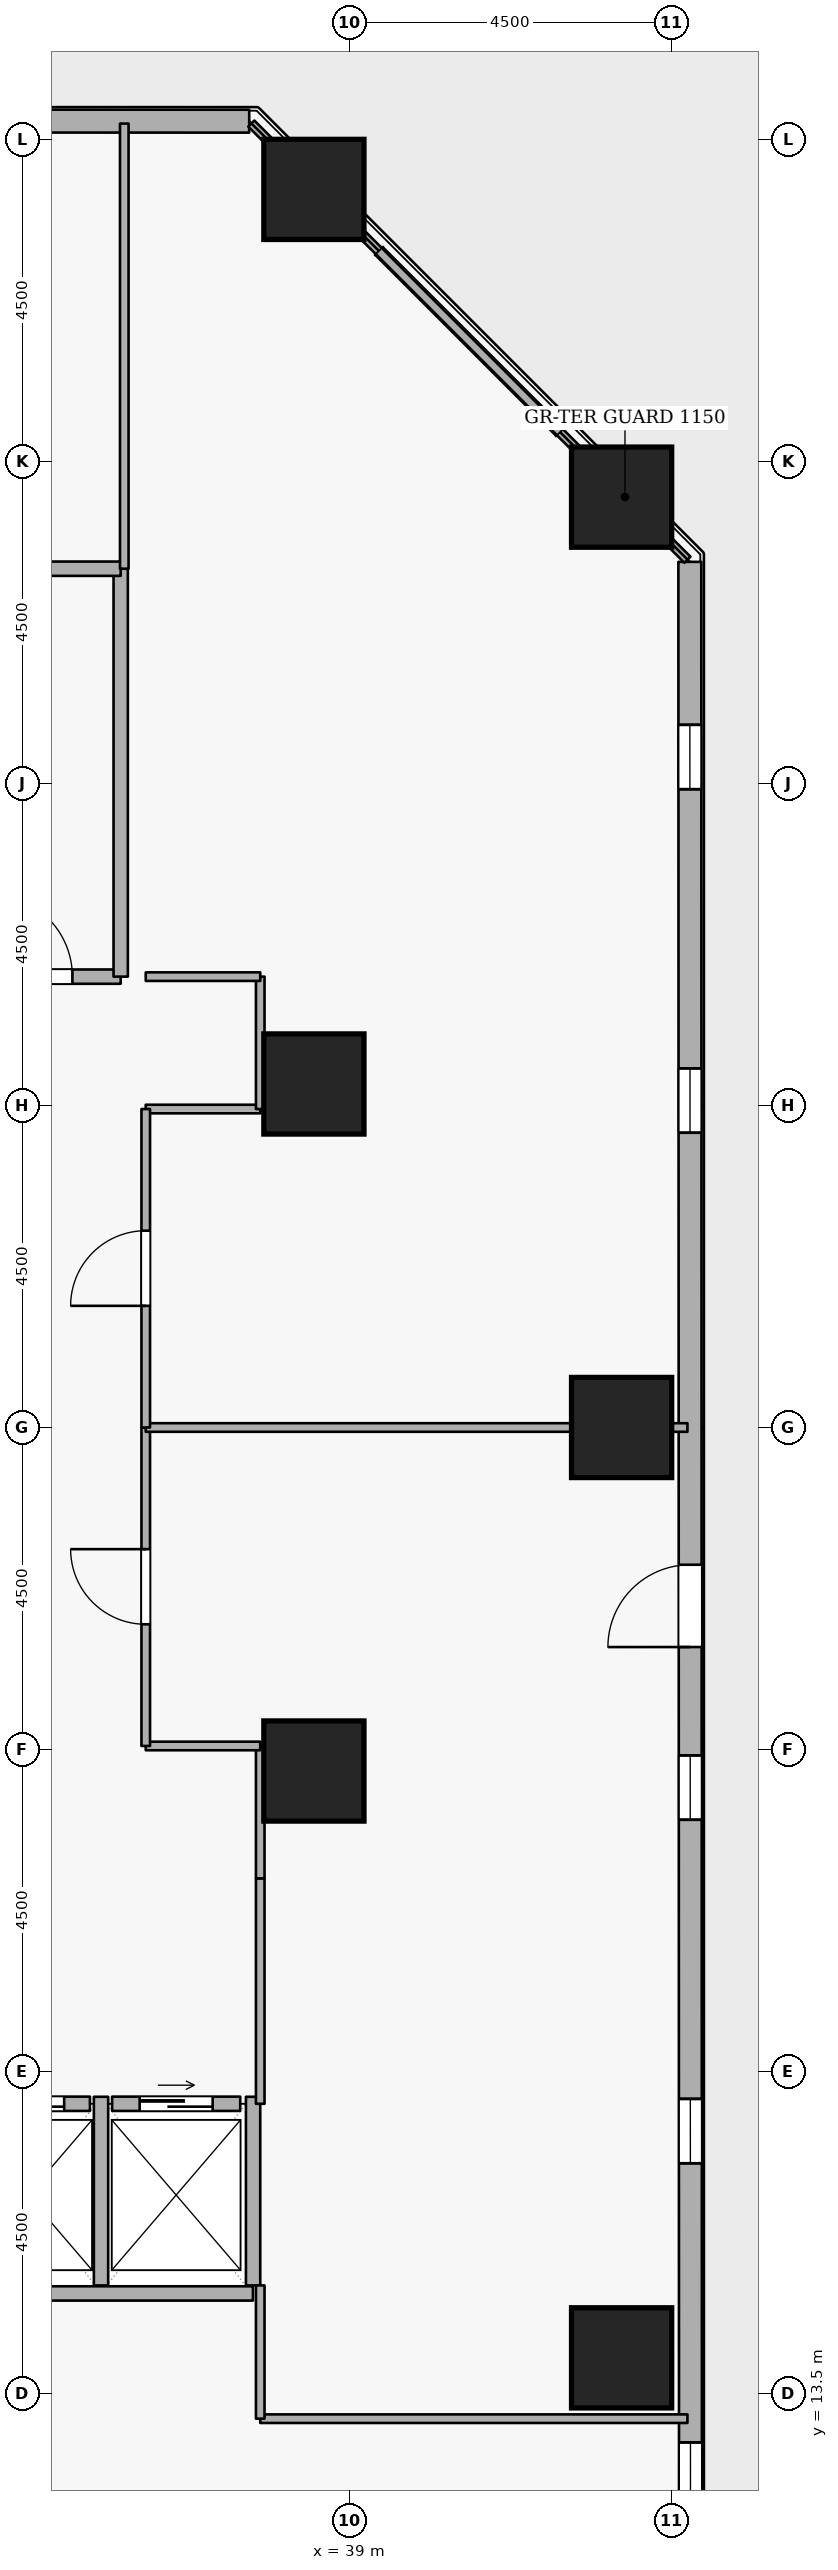
"""IFC4 building model, lengths in metres.
Left out: names, types, materials, properties, quantities, classifications, styles, units other than length and angle.
Written with IfcOpenShell. Run it as: python <this file> out.ifc"""

import sys

from ifc_helpers import new_model, si_unit, direction, frame, frame_2d, origin, origin_2d, place, context, subcontext, project, spatial, rectangle, extrude, element, fill, save


model = new_model("IFC4")
c1 = context("Model", 3, precision=1e-05, world=origin(), true_north=direction((0.0, 1.0)))
c2 = subcontext(c1, "Body", "Model", "MODEL_VIEW")
j1 = project(units=[si_unit("LENGTHUNIT", "METRE"), si_unit("PLANEANGLEUNIT", "RADIAN")], contexts=[c1])
p1 = place(None, origin())
s1 = spatial("IfcSite", under=j1, at=p1, CompositionType="ELEMENT")
p2 = place(p1, origin())
s2 = spatial("IfcBuilding", under=s1, at=p2, CompositionType="ELEMENT")
p3 = place(p2, frame((0.0, 0.0, 27.9)))
s3 = spatial("IfcBuildingStorey", under=s2, at=p3, CompositionType="ELEMENT", Elevation=27.9)
for number, where, z_axis, x_axis in (
    (1, (42.8, 14.0, 0.0), (0.0, 0.0, 1.0), (1.0, 0.0, 0.0)),
    (2, (42.8, 27.0, 0.0), (0.0, 0.0, 1.0), (1.0, 0.0, 0.0)),
    (3, (42.8, 40.0, 0.0), (0.0, 0.0, 1.0), (1.0, 0.0, 0.0)),
    (4, (38.5, 44.3, 0.0), (0.0, 0.0, 1.0), (1.0, 0.0, 0.0)),
    (5, (38.5, 22.2, 0.0), (0.0, 0.0, 1.0), (1.0, 0.0, 0.0)),
    (6, (38.5, 31.8, 0.0), (0.0, 0.0, 1.0), (1.0, 0.0, 0.0)),
):
    element("IfcColumn", number, at=place(p3, frame(where, z_axis=z_axis, x_axis=x_axis)), inside=s3, PredefinedType="COLUMN", context=c2, shape_type="SweptSolid", body=[
        extrude(rectangle(XDim=1.4, YDim=1.4, at=origin_2d()), origin(), (0.0, 0.0, 1.0), 3.6),
    ])
p4 = place(p3, frame((43.765, 5.319, 0.0), z_axis=(0.0, 0.0, 1.0), x_axis=(-0.000339718087, 0.999999942296, 0.0)))
e7 = element("IfcWall", 7, at=p4, inside=s3, PredefinedType="STANDARD", context=c2, shape_type="SweptSolid", body=[
    extrude(rectangle(XDim=33.777, YDim=0.32, at=frame_2d((16.888, 0.0))), origin(), (0.0, 0.0, 1.0), 2.7),
])
p5 = place(p4, frame((18.614, 0.0, 0.0)))
e8 = element("IfcOpeningElement", 8, at=p5, cuts=e7, PredefinedType="OPENING", context=c2, shape_type="SweptSolid", body=[
    extrude(rectangle(XDim=1.15, YDim=2.1, at=frame_2d((0.575, 1.05))), frame((0.0, 0.17, 0.0), z_axis=(0.0, -1.0, 0.0), x_axis=(1.0, 0.0, 0.0)), (0.0, 0.0, 1.0), 0.34),
])
p6 = place(p4, frame((1.8, 0.0, 0.72)))
e9 = element("IfcOpeningElement", 9, at=p6, cuts=e7, PredefinedType="OPENING", context=c2, shape_type="SweptSolid", body=[
    extrude(rectangle(XDim=0.9, YDim=1.75, at=frame_2d((0.45, 0.875))), frame((0.0, 0.17, 0.0), z_axis=(0.0, -1.0, 0.0), x_axis=(1.0, 0.0, 0.0)), (0.0, 0.0, 1.0), 0.34),
])
p7 = place(p4, frame((6.6, 0.0, 0.72)))
e10 = element("IfcOpeningElement", 10, at=p7, cuts=e7, PredefinedType="OPENING", context=c2, shape_type="SweptSolid", body=[
    extrude(rectangle(XDim=0.9, YDim=1.75, at=frame_2d((0.45, 0.875))), frame((0.0, 0.17, 0.0), z_axis=(0.0, -1.0, 0.0), x_axis=(1.0, 0.0, 0.0)), (0.0, 0.0, 1.0), 0.34),
])
p8 = place(p4, frame((11.4, 0.0, 0.72)))
e11 = element("IfcOpeningElement", 11, at=p8, cuts=e7, PredefinedType="OPENING", context=c2, shape_type="SweptSolid", body=[
    extrude(rectangle(XDim=0.9, YDim=1.75, at=frame_2d((0.45, 0.875))), frame((0.0, 0.17, 0.0), z_axis=(0.0, -1.0, 0.0), x_axis=(1.0, 0.0, 0.0)), (0.0, 0.0, 1.0), 0.34),
])
p9 = place(p4, frame((16.2, 0.0, 0.72)))
e12 = element("IfcOpeningElement", 12, at=p9, cuts=e7, PredefinedType="OPENING", context=c2, shape_type="SweptSolid", body=[
    extrude(rectangle(XDim=0.9, YDim=1.75, at=frame_2d((0.45, 0.875))), frame((0.0, 0.17, 0.0), z_axis=(0.0, -1.0, 0.0), x_axis=(1.0, 0.0, 0.0)), (0.0, 0.0, 1.0), 0.34),
])
p10 = place(p4, frame((25.8, 0.0, 0.72)))
e13 = element("IfcOpeningElement", 13, at=p10, cuts=e7, PredefinedType="OPENING", context=c2, shape_type="SweptSolid", body=[
    extrude(rectangle(XDim=0.9, YDim=1.75, at=frame_2d((0.45, 0.875))), frame((0.0, 0.17, 0.0), z_axis=(0.0, -1.0, 0.0), x_axis=(1.0, 0.0, 0.0)), (0.0, 0.0, 1.0), 0.34),
])
p11 = place(p4, frame((30.6, 0.0, 0.72)))
e14 = element("IfcOpeningElement", 14, at=p11, cuts=e7, PredefinedType="OPENING", context=c2, shape_type="SweptSolid", body=[
    extrude(rectangle(XDim=0.9, YDim=1.75, at=frame_2d((0.45, 0.875))), frame((0.0, 0.17, 0.0), z_axis=(0.0, -1.0, 0.0), x_axis=(1.0, 0.0, 0.0)), (0.0, 0.0, 1.0), 0.34),
])
p12 = place(p3, frame((37.596, 45.253, 0.0), z_axis=(0.0, 0.0, 1.0), x_axis=(-0.999999942296, 0.000339718087, 0.0)))
e15 = element("IfcWall", 15, at=p12, inside=s3, PredefinedType="STANDARD", context=c2, shape_type="SweptSolid", body=[
    extrude(rectangle(XDim=33.777, YDim=0.32, at=frame_2d((16.888, 0.0))), origin(), (0.0, 0.0, 1.0), 2.7),
])
p13 = place(p12, frame((27.164, 0.0, 0.0)))
e16 = element("IfcOpeningElement", 16, at=p13, cuts=e15, PredefinedType="OPENING", context=c2, shape_type="SweptSolid", body=[
    extrude(rectangle(XDim=1.15, YDim=2.1, at=frame_2d((0.575, 1.05))), frame((0.0, 0.17, 0.0), z_axis=(0.0, -1.0, 0.0), x_axis=(1.0, 0.0, 0.0)), (0.0, 0.0, 1.0), 0.34),
])
p14 = place(p12, frame((6.6, 0.0, 0.72)))
e17 = element("IfcOpeningElement", 17, at=p14, cuts=e15, PredefinedType="OPENING", context=c2, shape_type="SweptSolid", body=[
    extrude(rectangle(XDim=0.9, YDim=1.75, at=frame_2d((0.45, 0.875))), frame((0.0, 0.17, 0.0), z_axis=(0.0, -1.0, 0.0), x_axis=(1.0, 0.0, 0.0)), (0.0, 0.0, 1.0), 0.34),
])
p15 = place(p12, frame((16.2, 0.0, 0.72)))
e18 = element("IfcOpeningElement", 18, at=p15, cuts=e15, PredefinedType="OPENING", context=c2, shape_type="SweptSolid", body=[
    extrude(rectangle(XDim=0.9, YDim=1.75, at=frame_2d((0.45, 0.875))), frame((0.0, 0.17, 0.0), z_axis=(0.0, -1.0, 0.0), x_axis=(1.0, 0.0, 0.0)), (0.0, 0.0, 1.0), 0.34),
])
p16 = place(p12, frame((21.0, 0.0, 0.72)))
e19 = element("IfcOpeningElement", 19, at=p16, cuts=e15, PredefinedType="OPENING", context=c2, shape_type="SweptSolid", body=[
    extrude(rectangle(XDim=0.9, YDim=1.75, at=frame_2d((0.45, 0.875))), frame((0.0, 0.17, 0.0), z_axis=(0.0, -1.0, 0.0), x_axis=(1.0, 0.0, 0.0)), (0.0, 0.0, 1.0), 0.34),
])
p17 = place(p12, frame((30.6, 0.0, 0.72)))
e20 = element("IfcOpeningElement", 20, at=p17, cuts=e15, PredefinedType="OPENING", context=c2, shape_type="SweptSolid", body=[
    extrude(rectangle(XDim=0.9, YDim=1.75, at=frame_2d((0.45, 0.875))), frame((0.0, 0.17, 0.0), z_axis=(0.0, -1.0, 0.0), x_axis=(1.0, 0.0, 0.0)), (0.0, 0.0, 1.0), 0.34),
])
p18 = place(p3, frame((33.63, 17.55, 0.0), z_axis=(0.0, 0.0, 1.0), x_axis=(1.0, 0.0, 0.0)))
e21 = element("IfcWall", 21, at=p18, inside=s3, PredefinedType="STANDARD", context=c2, shape_type="SweptSolid", body=[
    extrude(rectangle(XDim=1.74, YDim=0.2, at=frame_2d((0.87, 0.0))), origin(), (0.0, 0.0, 1.0), 3.34),
])
p19 = place(p18, frame((0.36, 0.0, 0.0)))
e22 = element("IfcOpeningElement", 22, at=p19, cuts=e21, PredefinedType="OPENING", context=c2, shape_type="SweptSolid", body=[
    extrude(rectangle(XDim=1.02, YDim=2.06, at=frame_2d((0.51, 1.03))), frame((0.0, 0.11, 0.0), z_axis=(0.0, -1.0, 0.0), x_axis=(1.0, 0.0, 0.0)), (0.0, 0.0, 1.0), 0.22),
])
p20 = place(p3, frame((35.68, 17.55, 0.0), z_axis=(0.0, 0.0, 1.0), x_axis=(1.0, 0.0, 0.0)))
e23 = element("IfcWall", 23, at=p20, inside=s3, PredefinedType="STANDARD", context=c2, shape_type="SweptSolid", body=[
    extrude(rectangle(XDim=1.79, YDim=0.2, at=frame_2d((0.895, 0.0))), origin(), (0.0, 0.0, 1.0), 3.34),
])
p21 = place(p20, frame((0.385, 0.0, 0.0)))
e24 = element("IfcOpeningElement", 24, at=p21, cuts=e23, PredefinedType="OPENING", context=c2, shape_type="SweptSolid", body=[
    extrude(rectangle(XDim=1.02, YDim=2.06, at=frame_2d((0.51, 1.03))), frame((0.0, 0.11, 0.0), z_axis=(0.0, -1.0, 0.0), x_axis=(1.0, 0.0, 0.0)), (0.0, 0.0, 1.0), 0.22),
])
p22 = place(p3, frame((33.452, 14.9, 0.0), z_axis=(0.0, 0.0, 1.0), x_axis=(1.0, 0.0, 0.0)))
e25 = element("IfcWall", 25, at=p22, inside=s3, PredefinedType="STANDARD", context=c2, shape_type="SweptSolid", body=[
    extrude(rectangle(XDim=4.196, YDim=0.2, at=frame_2d((2.098, 0.0))), origin(), (0.0, 0.0, 1.0), 3.34),
])
for number, where, z_axis, x_axis in (
    (26, (35.525, 15.012, 0.0), (0.0, 0.0, 1.0), (0.0, 1.0, 0.0)),
    (27, (37.65, 15.012, 0.0), (0.0, 0.0, 1.0), (0.0, 1.0, 0.0)),
):
    element("IfcWall", number, at=place(p3, frame(where, z_axis=z_axis, x_axis=x_axis)), inside=s3, PredefinedType="STANDARD", context=c2, shape_type="SweptSolid", body=[
        extrude(rectangle(XDim=2.636, YDim=0.2, at=frame_2d((1.318, 0.0))), origin(), (0.0, 0.0, 1.0), 3.34),
    ])
p23 = place(p3, frame((33.3, 33.3, 0.0), z_axis=(0.0, 0.0, 1.0), x_axis=(1.0, 0.0, 0.0)))
e28 = element("IfcWall", 28, at=p23, inside=s3, PredefinedType="STANDARD", context=c2, shape_type="SweptSolid", body=[
    extrude(rectangle(XDim=2.5, YDim=0.2, at=frame_2d((1.25, 0.0))), origin(), (0.0, 0.0, 1.0), 3.34),
])
p24 = place(p23, frame((0.675, 0.0, 0.0)))
e29 = element("IfcOpeningElement", 29, at=p24, cuts=e28, PredefinedType="OPENING", context=c2, shape_type="SweptSolid", body=[
    extrude(rectangle(XDim=1.15, YDim=2.1, at=frame_2d((0.575, 1.05))), frame((0.0, 0.11, 0.0), z_axis=(0.0, -1.0, 0.0), x_axis=(1.0, 0.0, 0.0)), (0.0, 0.0, 1.0), 0.22),
])
p25 = place(p3, frame((35.8, 33.3, 0.0), z_axis=(0.0, 0.0, 1.0), x_axis=(0.0, 1.0, 0.0)))
e30 = element("IfcWall", 30, at=p25, inside=s3, PredefinedType="STANDARD", context=c2, shape_type="SweptSolid", body=[
    extrude(rectangle(XDim=5.7, YDim=0.2, at=frame_2d((2.85, 0.0))), origin(), (0.0, 0.0, 1.0), 3.34),
])
p26 = place(p3, frame((35.8, 39.0, 0.0), z_axis=(0.0, 0.0, 1.0), x_axis=(-1.0, 0.0, 0.0)))
e31 = element("IfcWall", 31, at=p26, inside=s3, PredefinedType="STANDARD", context=c2, shape_type="SweptSolid", body=[
    extrude(rectangle(XDim=2.5, YDim=0.2, at=frame_2d((1.25, 0.0))), origin(), (0.0, 0.0, 1.0), 3.34),
])
p27 = place(p3, frame((37.75, 17.55, 0.0), z_axis=(0.0, 0.0, 1.0), x_axis=(0.0, 1.0, 0.0)))
e32 = element("IfcWall", 32, at=p27, inside=s3, PredefinedType="PARTITIONING", context=c2, shape_type="SweptSolid", body=[
    extrude(rectangle(XDim=3.15, YDim=0.12, at=frame_2d((1.575, 0.0))), origin(), (0.0, 0.0, 1.0), 3.34),
])
p28 = place(p3, frame((37.75, 20.7, 0.0), z_axis=(0.0, 0.0, 1.0), x_axis=(0.0, 1.0, 0.0)))
e33 = element("IfcWall", 33, at=p28, inside=s3, PredefinedType="PARTITIONING", context=c2, shape_type="SweptSolid", body=[
    extrude(rectangle(XDim=1.85, YDim=0.12, at=frame_2d((0.925, 0.0))), origin(), (0.0, 0.0, 1.0), 3.34),
])
p29 = place(p3, frame((37.75, 22.55, 0.0), z_axis=(0.0, 0.0, 1.0), x_axis=(-1.0, 0.0, 0.0)))
e34 = element("IfcWall", 34, at=p29, inside=s3, PredefinedType="PARTITIONING", context=c2, shape_type="SweptSolid", body=[
    extrude(rectangle(XDim=1.6, YDim=0.12, at=frame_2d((0.8, 0.0))), origin(), (0.0, 0.0, 1.0), 3.34),
])
p30 = place(p3, frame((36.15, 22.55, 0.0), z_axis=(0.0, 0.0, 1.0), x_axis=(0.0, 1.0, 0.0)))
e35 = element("IfcWall", 35, at=p30, inside=s3, PredefinedType="PARTITIONING", context=c2, shape_type="SweptSolid", body=[
    extrude(rectangle(XDim=4.45, YDim=0.12, at=frame_2d((2.225, 0.0))), origin(), (0.0, 0.0, 1.0), 3.34),
])
p31 = place(p30, frame((1.7, 0.0, 0.0)))
e36 = element("IfcOpeningElement", 36, at=p31, cuts=e35, PredefinedType="OPENING", context=c2, shape_type="SweptSolid", body=[
    extrude(rectangle(XDim=1.05, YDim=2.1, at=frame_2d((0.525, 1.05))), frame((0.0, 0.07, 0.0), z_axis=(0.0, -1.0, 0.0), x_axis=(1.0, 0.0, 0.0)), (0.0, 0.0, 1.0), 0.14),
])
p32 = place(p3, frame((36.15, 27.0, 0.0), z_axis=(0.0, 0.0, 1.0), x_axis=(1.0, 0.0, 0.0)))
e37 = element("IfcWall", 37, at=p32, inside=s3, PredefinedType="PARTITIONING", context=c2, shape_type="SweptSolid", body=[
    extrude(rectangle(XDim=7.57, YDim=0.12, at=frame_2d((3.785, 0.0))), origin(), (0.0, 0.0, 1.0), 2.878),
])
p33 = place(p3, frame((43.72, 13.15, 0.0), z_axis=(0.0, 0.0, 1.0), x_axis=(-1.0, 0.0, 0.0)))
e38 = element("IfcWall", 38, at=p33, inside=s3, PredefinedType="PARTITIONING", context=c2, shape_type="SweptSolid", body=[
    extrude(rectangle(XDim=5.97, YDim=0.12, at=frame_2d((2.985, 0.0))), origin(), (0.0, 0.0, 1.0), 3.34),
])
p34 = place(p3, frame((37.75, 13.15, 0.0), z_axis=(0.0, 0.0, 1.0), x_axis=(0.0, 1.0, 0.0)))
e39 = element("IfcWall", 39, at=p34, inside=s3, PredefinedType="PARTITIONING", context=c2, shape_type="SweptSolid", body=[
    extrude(rectangle(XDim=1.862, YDim=0.12, at=frame_2d((0.931, 0.0))), origin(), (0.0, 0.0, 1.0), 3.34),
])
p35 = place(p3, frame((36.15, 31.45, 0.0), z_axis=(0.0, 0.0, 1.0), x_axis=(1.0, 0.0, 0.0)))
e40 = element("IfcWall", 40, at=p35, inside=s3, PredefinedType="PARTITIONING", context=c2, shape_type="SweptSolid", body=[
    extrude(rectangle(XDim=1.6, YDim=0.12, at=frame_2d((0.8, 0.0))), origin(), (0.0, 0.0, 1.0), 3.34),
])
p36 = place(p3, frame((37.75, 31.45, 0.0), z_axis=(0.0, 0.0, 1.0), x_axis=(0.0, 1.0, 0.0)))
e41 = element("IfcWall", 41, at=p36, inside=s3, PredefinedType="PARTITIONING", context=c2, shape_type="SweptSolid", body=[
    extrude(rectangle(XDim=1.85, YDim=0.12, at=frame_2d((0.925, 0.0))), origin(), (0.0, 0.0, 1.0), 3.34),
])
p37 = place(p3, frame((37.75, 33.3, 0.0), z_axis=(0.0, 0.0, 1.0), x_axis=(-1.0, 0.0, 0.0)))
e42 = element("IfcWall", 42, at=p37, inside=s3, PredefinedType="PARTITIONING", context=c2, shape_type="SweptSolid", body=[
    extrude(rectangle(XDim=1.6, YDim=0.12, at=frame_2d((0.8, 0.0))), origin(), (0.0, 0.0, 1.0), 3.34),
])
p38 = place(p3, frame((35.85, 39.0, 0.0), z_axis=(0.0, 0.0, 1.0), x_axis=(0.0, 1.0, 0.0)))
e43 = element("IfcWall", 43, at=p38, inside=s3, PredefinedType="PARTITIONING", context=c2, shape_type="SweptSolid", body=[
    extrude(rectangle(XDim=6.22, YDim=0.12, at=frame_2d((3.11, 0.0))), origin(), (0.0, 0.0, 1.0), 3.34),
])
p39 = place(p3, frame((37.625, 45.22, 0.0), z_axis=(0.0, 0.0, 1.0), x_axis=(0.707106781187, -0.707106781187, 0.0)))
e44 = element("IfcWall", 44, at=p39, inside=s3, PredefinedType="PARTITIONING", context=c2, shape_type="SweptSolid", body=[
    extrude(rectangle(XDim=8.619, YDim=0.12, at=frame_2d((4.31, 0.0))), origin(), (0.0, 0.0, 1.0), 3.34),
])
p40 = place(p3, frame((36.15, 27.0, 0.0), z_axis=(0.0, 0.0, 1.0), x_axis=(0.0, 1.0, 0.0)))
e45 = element("IfcWall", 45, at=p40, inside=s3, PredefinedType="PARTITIONING", context=c2, shape_type="SweptSolid", body=[
    extrude(rectangle(XDim=4.45, YDim=0.12, at=frame_2d((2.225, 0.0))), origin(), (0.0, 0.0, 1.0), 3.34),
])
p41 = place(p40, frame((1.7, 0.0, 0.0)))
e46 = element("IfcOpeningElement", 46, at=p41, cuts=e45, PredefinedType="OPENING", context=c2, shape_type="SweptSolid", body=[
    extrude(rectangle(XDim=1.05, YDim=2.1, at=frame_2d((0.525, 1.05))), frame((0.0, 0.07, 0.0), z_axis=(0.0, -1.0, 0.0), x_axis=(1.0, 0.0, 0.0)), (0.0, 0.0, 1.0), 0.14),
])
p42 = place(p5, origin())
e47 = element("IfcDoor", 47, at=p42, inside=s3, OperationType="SINGLE_SWING_LEFT", PredefinedType="DOOR", context=c2, shape_type="SweptSolid", body=[
    extrude(rectangle(XDim=1.15, YDim=2.1, at=frame_2d((0.575, 1.05))), frame((0.0, 0.025, 0.0), z_axis=(0.0, -1.0, 0.0), x_axis=(1.0, 0.0, 0.0)), (0.0, 0.0, 1.0), 0.05),
])
fill(e8, e47)
p43 = place(p7, origin())
e48 = element("IfcWindow", 48, at=p43, inside=s3, PartitioningType="SINGLE_PANEL", PredefinedType="WINDOW", context=c2, shape_type="SweptSolid", body=[
    extrude(rectangle(XDim=0.9, YDim=1.75, at=frame_2d((0.45, 0.875))), frame((0.0, 0.03, 0.0), z_axis=(0.0, -1.0, 0.0), x_axis=(1.0, 0.0, 0.0)), (0.0, 0.0, 1.0), 0.06),
])
fill(e10, e48)
p44 = place(p8, origin())
e49 = element("IfcWindow", 49, at=p44, inside=s3, PartitioningType="SINGLE_PANEL", PredefinedType="WINDOW", context=c2, shape_type="SweptSolid", body=[
    extrude(rectangle(XDim=0.9, YDim=1.75, at=frame_2d((0.45, 0.875))), frame((0.0, 0.03, 0.0), z_axis=(0.0, -1.0, 0.0), x_axis=(1.0, 0.0, 0.0)), (0.0, 0.0, 1.0), 0.06),
])
fill(e11, e49)
p45 = place(p9, origin())
e50 = element("IfcWindow", 50, at=p45, inside=s3, PartitioningType="SINGLE_PANEL", PredefinedType="WINDOW", context=c2, shape_type="SweptSolid", body=[
    extrude(rectangle(XDim=0.9, YDim=1.75, at=frame_2d((0.45, 0.875))), frame((0.0, 0.03, 0.0), z_axis=(0.0, -1.0, 0.0), x_axis=(1.0, 0.0, 0.0)), (0.0, 0.0, 1.0), 0.06),
])
fill(e12, e50)
p46 = place(p10, origin())
e51 = element("IfcWindow", 51, at=p46, inside=s3, PartitioningType="SINGLE_PANEL", PredefinedType="WINDOW", context=c2, shape_type="SweptSolid", body=[
    extrude(rectangle(XDim=0.9, YDim=1.75, at=frame_2d((0.45, 0.875))), frame((0.0, 0.03, 0.0), z_axis=(0.0, -1.0, 0.0), x_axis=(1.0, 0.0, 0.0)), (0.0, 0.0, 1.0), 0.06),
])
fill(e13, e51)
p47 = place(p11, origin())
e52 = element("IfcWindow", 52, at=p47, inside=s3, PartitioningType="SINGLE_PANEL", PredefinedType="WINDOW", context=c2, shape_type="SweptSolid", body=[
    extrude(rectangle(XDim=0.9, YDim=1.75, at=frame_2d((0.45, 0.875))), frame((0.0, 0.03, 0.0), z_axis=(0.0, -1.0, 0.0), x_axis=(1.0, 0.0, 0.0)), (0.0, 0.0, 1.0), 0.06),
])
fill(e14, e52)
p48 = place(p19, origin())
e53 = element("IfcDoor", 53, at=p48, inside=s3, OperationType="SLIDING_TO_LEFT", PredefinedType="DOOR", context=c2, shape_type="SweptSolid", body=[
    extrude(rectangle(XDim=1.02, YDim=2.06, at=frame_2d((0.51, 1.03))), frame((0.0, 0.025, 0.0), z_axis=(0.0, -1.0, 0.0), x_axis=(1.0, 0.0, 0.0)), (0.0, 0.0, 1.0), 0.05),
])
fill(e22, e53)
p49 = place(p21, origin())
e54 = element("IfcDoor", 54, at=p49, inside=s3, OperationType="SLIDING_TO_LEFT", PredefinedType="DOOR", context=c2, shape_type="SweptSolid", body=[
    extrude(rectangle(XDim=1.02, YDim=2.06, at=frame_2d((0.51, 1.03))), frame((0.0, 0.025, 0.0), z_axis=(0.0, -1.0, 0.0), x_axis=(1.0, 0.0, 0.0)), (0.0, 0.0, 1.0), 0.05),
])
fill(e24, e54)
p50 = place(p24, origin())
e55 = element("IfcDoor", 55, at=p50, inside=s3, OperationType="SINGLE_SWING_LEFT", PredefinedType="DOOR", context=c2, shape_type="SweptSolid", body=[
    extrude(rectangle(XDim=1.15, YDim=2.1, at=frame_2d((0.575, 1.05))), frame((0.0, 0.025, 0.0), z_axis=(0.0, -1.0, 0.0), x_axis=(1.0, 0.0, 0.0)), (0.0, 0.0, 1.0), 0.05),
])
fill(e29, e55)
p51 = place(p31, origin())
e56 = element("IfcDoor", 56, at=p51, inside=s3, OperationType="SINGLE_SWING_RIGHT", PredefinedType="DOOR", context=c2, shape_type="SweptSolid", body=[
    extrude(rectangle(XDim=1.05, YDim=2.1, at=frame_2d((0.525, 1.05))), frame((0.0, 0.025, 0.0), z_axis=(0.0, -1.0, 0.0), x_axis=(1.0, 0.0, 0.0)), (0.0, 0.0, 1.0), 0.05),
])
fill(e36, e56)
p52 = place(p41, origin())
e57 = element("IfcDoor", 57, at=p52, inside=s3, OperationType="SINGLE_SWING_LEFT", PredefinedType="DOOR", context=c2, shape_type="SweptSolid", body=[
    extrude(rectangle(XDim=1.05, YDim=2.1, at=frame_2d((0.525, 1.05))), frame((0.0, 0.025, 0.0), z_axis=(0.0, -1.0, 0.0), x_axis=(1.0, 0.0, 0.0)), (0.0, 0.0, 1.0), 0.05),
])
fill(e46, e57)
save(model, sys.argv[1])
